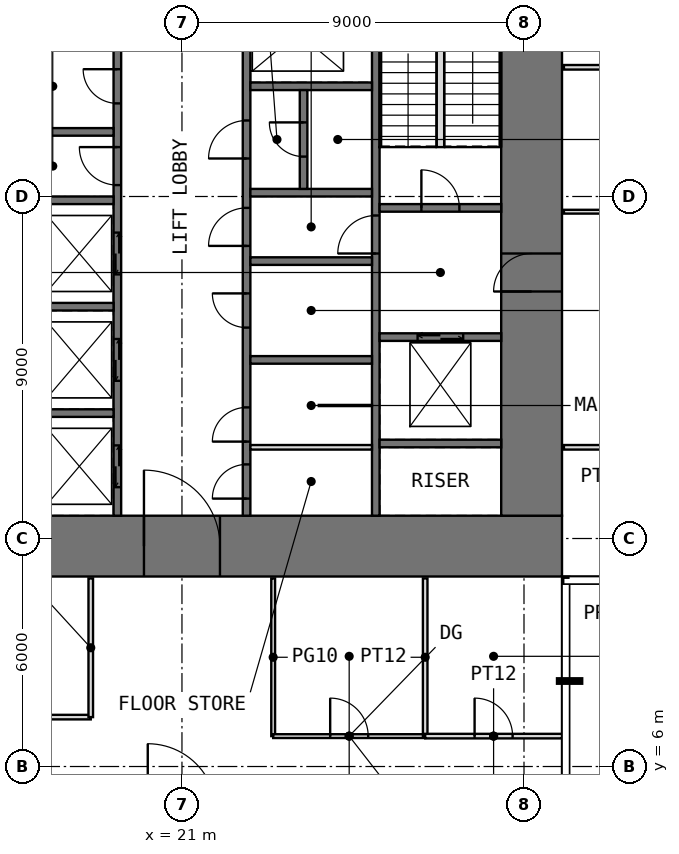
"""IFC4 building model, lengths in metres.
Left out: names, types, materials, properties, quantities, classifications, styles, units other than length and angle.
Written with IfcOpenShell. Run it as: python <this file> out.ifc"""

import sys

from ifc_helpers import new_model, si_unit, direction, frame, frame_2d, origin, place, context, subcontext, project, spatial, rectangle, extrude, element, fill, save


model = new_model("IFC4")
c1 = context("Model", 3, precision=1e-05, world=origin(), true_north=direction((0.0, 1.0)))
c2 = subcontext(c1, "Body", "Model", "MODEL_VIEW")
j1 = project(units=[si_unit("LENGTHUNIT", "METRE"), si_unit("PLANEANGLEUNIT", "RADIAN")], contexts=[c1])
p1 = place(None, origin())
s1 = spatial("IfcSite", under=j1, at=p1, CompositionType="ELEMENT")
p2 = place(p1, origin())
s2 = spatial("IfcBuilding", under=s1, at=p2, CompositionType="ELEMENT")
p3 = place(p2, frame((0.0, 0.0, 148.5)))
s3 = spatial("IfcBuildingStorey", under=s2, at=p3, CompositionType="ELEMENT", Elevation=148.5)
p4 = place(p3, frame((11.0, 11.8, -0.05), z_axis=(0.0, 0.0, 1.0), x_axis=(1.0, 0.0, 0.0)))
e1 = element("IfcWall", 1, at=p4, inside=s3, PredefinedType="SHEAR", context=c2, shape_type="SweptSolid", body=[
    extrude(rectangle(XDim=20.0, YDim=1.6, at=frame_2d((10.0, 0.0))), origin(), (0.0, 0.0, 1.0), 4.0),
])
p5 = place(p4, frame((9.0, 0.0, 0.05)))
e2 = element("IfcOpeningElement", 2, at=p5, cuts=e1, PredefinedType="OPENING", context=c2, shape_type="SweptSolid", body=[
    extrude(rectangle(XDim=2.0, YDim=2.2, at=frame_2d((1.0, 1.1))), frame((0.0, 0.81, 0.0), z_axis=(0.0, -1.0, 0.0), x_axis=(1.0, 0.0, 0.0)), (0.0, 0.0, 1.0), 1.62),
])
p6 = place(p3, frame((30.2, 12.6, -0.05), z_axis=(0.0, 0.0, 1.0), x_axis=(0.0, 1.0, 0.0)))
e3 = element("IfcWall", 3, at=p6, inside=s3, PredefinedType="SHEAR", context=c2, shape_type="SweptSolid", body=[
    extrude(rectangle(XDim=16.8, YDim=1.6, at=frame_2d((8.4, 0.0))), origin(), (0.0, 0.0, 1.0), 4.0),
])
p7 = place(p6, frame((5.9, 0.0, 0.05)))
e4 = element("IfcOpeningElement", 4, at=p7, cuts=e3, PredefinedType="OPENING", context=c2, shape_type="SweptSolid", body=[
    extrude(rectangle(XDim=1.0, YDim=2.2, at=frame_2d((0.5, 1.1))), frame((0.0, 0.81, 0.0), z_axis=(0.0, -1.0, 0.0), x_axis=(1.0, 0.0, 0.0)), (0.0, 0.0, 1.0), 1.62),
])
p8 = place(p3, frame((19.3, 12.6, -0.05), z_axis=(0.0, 0.0, 1.0), x_axis=(0.0, 1.0, 0.0)))
e5 = element("IfcWall", 5, at=p8, inside=s3, PredefinedType="SHEAR", context=c2, shape_type="SweptSolid", body=[
    extrude(rectangle(XDim=16.8, YDim=0.2, at=frame_2d((8.4, 0.0))), origin(), (0.0, 0.0, 1.0), 4.0),
])
p9 = place(p8, frame((8.7, 0.0, 0.05)))
e6 = element("IfcOpeningElement", 6, at=p9, cuts=e5, PredefinedType="OPENING", context=c2, shape_type="SweptSolid", body=[
    extrude(rectangle(XDim=1.0, YDim=2.2, at=frame_2d((0.5, 1.1))), frame((0.0, 0.11, 0.0), z_axis=(0.0, -1.0, 0.0), x_axis=(1.0, 0.0, 0.0)), (0.0, 0.0, 1.0), 0.22),
])
p10 = place(p8, frame((10.85, 0.0, 0.05)))
e7 = element("IfcOpeningElement", 7, at=p10, cuts=e5, PredefinedType="OPENING", context=c2, shape_type="SweptSolid", body=[
    extrude(rectangle(XDim=0.9, YDim=2.2, at=frame_2d((0.45, 1.1))), frame((0.0, 0.11, 0.0), z_axis=(0.0, -1.0, 0.0), x_axis=(1.0, 0.0, 0.0)), (0.0, 0.0, 1.0), 0.22),
])
p11 = place(p8, frame((13.3, 0.0, 0.05)))
e8 = element("IfcOpeningElement", 8, at=p11, cuts=e5, PredefinedType="OPENING", context=c2, shape_type="SweptSolid", body=[
    extrude(rectangle(XDim=1.0, YDim=2.2, at=frame_2d((0.5, 1.1))), frame((0.0, 0.11, 0.0), z_axis=(0.0, -1.0, 0.0), x_axis=(1.0, 0.0, 0.0)), (0.0, 0.0, 1.0), 0.22),
])
p12 = place(p8, frame((15.55, 0.0, 0.05)))
e9 = element("IfcOpeningElement", 9, at=p12, cuts=e5, PredefinedType="OPENING", context=c2, shape_type="SweptSolid", body=[
    extrude(rectangle(XDim=0.9, YDim=2.2, at=frame_2d((0.45, 1.1))), frame((0.0, 0.11, 0.0), z_axis=(0.0, -1.0, 0.0), x_axis=(1.0, 0.0, 0.0)), (0.0, 0.0, 1.0), 0.22),
])
p13 = place(p8, frame((0.75, 0.0, 0.05)))
e10 = element("IfcOpeningElement", 10, at=p13, cuts=e5, PredefinedType="OPENING", context=c2, shape_type="SweptSolid", body=[
    extrude(rectangle(XDim=1.1, YDim=2.2, at=frame_2d((0.55, 1.1))), frame((0.0, 0.11, 0.0), z_axis=(0.0, -1.0, 0.0), x_axis=(1.0, 0.0, 0.0)), (0.0, 0.0, 1.0), 0.22),
])
p14 = place(p8, frame((3.55, 0.0, 0.05)))
e11 = element("IfcOpeningElement", 11, at=p14, cuts=e5, PredefinedType="OPENING", context=c2, shape_type="SweptSolid", body=[
    extrude(rectangle(XDim=1.1, YDim=2.2, at=frame_2d((0.55, 1.1))), frame((0.0, 0.11, 0.0), z_axis=(0.0, -1.0, 0.0), x_axis=(1.0, 0.0, 0.0)), (0.0, 0.0, 1.0), 0.22),
])
p15 = place(p8, frame((6.35, 0.0, 0.05)))
e12 = element("IfcOpeningElement", 12, at=p15, cuts=e5, PredefinedType="OPENING", context=c2, shape_type="SweptSolid", body=[
    extrude(rectangle(XDim=1.1, YDim=2.2, at=frame_2d((0.55, 1.1))), frame((0.0, 0.11, 0.0), z_axis=(0.0, -1.0, 0.0), x_axis=(1.0, 0.0, 0.0)), (0.0, 0.0, 1.0), 0.22),
])
p16 = place(p3, frame((22.7, 12.6, -0.05), z_axis=(0.0, 0.0, 1.0), x_axis=(0.0, 1.0, 0.0)))
e13 = element("IfcWall", 13, at=p16, inside=s3, PredefinedType="SHEAR", context=c2, shape_type="SweptSolid", body=[
    extrude(rectangle(XDim=16.8, YDim=0.2, at=frame_2d((8.4, 0.0))), origin(), (0.0, 0.0, 1.0), 4.0),
])
p17 = place(p16, frame((0.45, 0.0, 0.05)))
e14 = element("IfcOpeningElement", 14, at=p17, cuts=e13, PredefinedType="OPENING", context=c2, shape_type="SweptSolid", body=[
    extrude(rectangle(XDim=0.9, YDim=2.2, at=frame_2d((0.45, 1.1))), frame((0.0, 0.11, 0.0), z_axis=(0.0, -1.0, 0.0), x_axis=(1.0, 0.0, 0.0)), (0.0, 0.0, 1.0), 0.22),
])
p18 = place(p16, frame((7.1, 0.0, 0.05)))
e15 = element("IfcOpeningElement", 15, at=p18, cuts=e13, PredefinedType="OPENING", context=c2, shape_type="SweptSolid", body=[
    extrude(rectangle(XDim=1.0, YDim=2.2, at=frame_2d((0.5, 1.1))), frame((0.0, 0.11, 0.0), z_axis=(0.0, -1.0, 0.0), x_axis=(1.0, 0.0, 0.0)), (0.0, 0.0, 1.0), 0.22),
])
p19 = place(p16, frame((1.95, 0.0, 0.05)))
e16 = element("IfcOpeningElement", 16, at=p19, cuts=e13, PredefinedType="OPENING", context=c2, shape_type="SweptSolid", body=[
    extrude(rectangle(XDim=0.9, YDim=2.2, at=frame_2d((0.45, 1.1))), frame((0.0, 0.11, 0.0), z_axis=(0.0, -1.0, 0.0), x_axis=(1.0, 0.0, 0.0)), (0.0, 0.0, 1.0), 0.22),
])
p20 = place(p16, frame((4.95, 0.0, 0.05)))
e17 = element("IfcOpeningElement", 17, at=p20, cuts=e13, PredefinedType="OPENING", context=c2, shape_type="SweptSolid", body=[
    extrude(rectangle(XDim=0.9, YDim=2.2, at=frame_2d((0.45, 1.1))), frame((0.0, 0.11, 0.0), z_axis=(0.0, -1.0, 0.0), x_axis=(1.0, 0.0, 0.0)), (0.0, 0.0, 1.0), 0.22),
])
p21 = place(p16, frame((9.4, 0.0, 0.05)))
e18 = element("IfcOpeningElement", 18, at=p21, cuts=e13, PredefinedType="OPENING", context=c2, shape_type="SweptSolid", body=[
    extrude(rectangle(XDim=1.0, YDim=2.2, at=frame_2d((0.5, 1.1))), frame((0.0, 0.11, 0.0), z_axis=(0.0, -1.0, 0.0), x_axis=(1.0, 0.0, 0.0)), (0.0, 0.0, 1.0), 0.22),
])
p22 = place(p3, frame((26.1, 12.6, -0.05), z_axis=(0.0, 0.0, 1.0), x_axis=(0.0, 1.0, 0.0)))
e19 = element("IfcWall", 19, at=p22, inside=s3, PredefinedType="SHEAR", context=c2, shape_type="SweptSolid", body=[
    extrude(rectangle(XDim=16.8, YDim=0.2, at=frame_2d((8.4, 0.0))), origin(), (0.0, 0.0, 1.0), 4.0),
])
p23 = place(p22, frame((6.9, 0.0, 0.05)))
e20 = element("IfcOpeningElement", 20, at=p23, cuts=e19, PredefinedType="OPENING", context=c2, shape_type="SweptSolid", body=[
    extrude(rectangle(XDim=1.0, YDim=2.2, at=frame_2d((0.5, 1.1))), frame((0.0, 0.11, 0.0), z_axis=(0.0, -1.0, 0.0), x_axis=(1.0, 0.0, 0.0)), (0.0, 0.0, 1.0), 0.22),
])
for number, where, z_axis, x_axis in (
    (21, (16.0, 15.3, -0.05), (0.0, 0.0, 1.0), (1.0, 0.0, 0.0)),
    (22, (16.0, 18.1, -0.05), (0.0, 0.0, 1.0), (1.0, 0.0, 0.0)),
    (23, (16.0, 20.9, -0.05), (0.0, 0.0, 1.0), (1.0, 0.0, 0.0)),
    (24, (16.0, 22.7, -0.05), (0.0, 0.0, 1.0), (1.0, 0.0, 0.0)),
    (25, (22.8, 16.7, -0.05), (0.0, 0.0, 1.0), (1.0, 0.0, 0.0)),
    (26, (22.8, 19.3, -0.05), (0.0, 0.0, 1.0), (1.0, 0.0, 0.0)),
    (27, (22.8, 21.1, -0.05), (0.0, 0.0, 1.0), (1.0, 0.0, 0.0)),
    (28, (22.8, 23.9, -0.05), (0.0, 0.0, 1.0), (1.0, 0.0, 0.0)),
    (29, (26.2, 14.5, -0.05), (0.0, 0.0, 1.0), (1.0, 0.0, 0.0)),
):
    element("IfcWall", number, at=place(p3, frame(where, z_axis=z_axis, x_axis=x_axis)), inside=s3, PredefinedType="SHEAR", context=c2, shape_type="SweptSolid", body=[
        extrude(rectangle(XDim=3.2, YDim=0.2, at=frame_2d((1.6, 0.0))), origin(), (0.0, 0.0, 1.0), 4.0),
    ])
p24 = place(p3, frame((26.2, 17.3, -0.05), z_axis=(0.0, 0.0, 1.0), x_axis=(1.0, 0.0, 0.0)))
e30 = element("IfcWall", 30, at=p24, inside=s3, PredefinedType="SHEAR", context=c2, shape_type="SweptSolid", body=[
    extrude(rectangle(XDim=3.2, YDim=0.2, at=frame_2d((1.6, 0.0))), origin(), (0.0, 0.0, 1.0), 4.0),
])
p25 = place(p24, frame((1.0, 0.0, 0.05)))
e31 = element("IfcOpeningElement", 31, at=p25, cuts=e30, PredefinedType="OPENING", context=c2, shape_type="SweptSolid", body=[
    extrude(rectangle(XDim=1.2, YDim=2.2, at=frame_2d((0.6, 1.1))), frame((0.0, 0.11, 0.0), z_axis=(0.0, -1.0, 0.0), x_axis=(1.0, 0.0, 0.0)), (0.0, 0.0, 1.0), 0.22),
])
p26 = place(p3, frame((26.2, 20.7, -0.05), z_axis=(0.0, 0.0, 1.0), x_axis=(1.0, 0.0, 0.0)))
e32 = element("IfcWall", 32, at=p26, inside=s3, PredefinedType="SHEAR", context=c2, shape_type="SweptSolid", body=[
    extrude(rectangle(XDim=3.2, YDim=0.2, at=frame_2d((1.6, 0.0))), origin(), (0.0, 0.0, 1.0), 4.0),
])
p27 = place(p26, frame((1.1, 0.0, 0.05)))
e33 = element("IfcOpeningElement", 33, at=p27, cuts=e32, PredefinedType="OPENING", context=c2, shape_type="SweptSolid", body=[
    extrude(rectangle(XDim=1.0, YDim=2.2, at=frame_2d((0.5, 1.1))), frame((0.0, 0.11, 0.0), z_axis=(0.0, -1.0, 0.0), x_axis=(1.0, 0.0, 0.0)), (0.0, 0.0, 1.0), 0.22),
])
p28 = place(p3, frame((22.8, 14.4, 0.0), z_axis=(0.0, 0.0, 1.0), x_axis=(1.0, 0.0, 0.0)))
e34 = element("IfcWall", 34, at=p28, inside=s3, PredefinedType="PARTITIONING", context=c2, shape_type="SweptSolid", body=[
    extrude(rectangle(XDim=3.2, YDim=0.12, at=frame_2d((1.6, 0.0))), origin(), (0.0, 0.0, 1.0), 3.75),
])
p29 = place(p3, frame((24.6, 15.5, 0.0), z_axis=(0.0, 0.0, 1.0), x_axis=(1.0, 0.0, 0.0)))
e35 = element("IfcWall", 35, at=p29, inside=s3, PredefinedType="PARTITIONING", context=c2, shape_type="SweptSolid", body=[
    extrude(rectangle(XDim=1.4, YDim=0.03, at=frame_2d((0.7, 0.0))), origin(), (0.0, 0.0, 1.0), 3.75),
])
p30 = place(p3, frame((24.2, 21.2, -0.05), z_axis=(0.0, 0.0, 1.0), x_axis=(0.0, 1.0, 0.0)))
e36 = element("IfcWall", 36, at=p30, inside=s3, PredefinedType="SHEAR", context=c2, shape_type="SweptSolid", body=[
    extrude(rectangle(XDim=2.6, YDim=0.2, at=frame_2d((1.3, 0.0))), origin(), (0.0, 0.0, 1.0), 4.0),
])
p31 = place(p30, frame((0.85, 0.0, 0.05)))
e37 = element("IfcOpeningElement", 37, at=p31, cuts=e36, PredefinedType="OPENING", context=c2, shape_type="SweptSolid", body=[
    extrude(rectangle(XDim=0.9, YDim=2.2, at=frame_2d((0.45, 1.1))), frame((0.0, 0.11, 0.0), z_axis=(0.0, -1.0, 0.0), x_axis=(1.0, 0.0, 0.0)), (0.0, 0.0, 1.0), 0.22),
])
p32 = place(p3, frame((15.0, 7.3, 0.0), z_axis=(0.0, 0.0, 1.0), x_axis=(1.0, 0.0, 0.0)))
e38 = element("IfcWall", 38, at=p32, inside=s3, PredefinedType="PARTITIONING", context=c2, shape_type="SweptSolid", body=[
    extrude(rectangle(XDim=3.6, YDim=0.12, at=frame_2d((1.8, 0.0))), origin(), (0.0, 0.0, 1.0), 3.75),
])
p33 = place(p32, frame((1.3, 0.0, 0.0)))
e39 = element("IfcOpeningElement", 39, at=p33, cuts=e38, PredefinedType="OPENING", context=c2, shape_type="SweptSolid", body=[
    extrude(rectangle(XDim=1.0, YDim=2.2, at=frame_2d((0.5, 1.1))), frame((0.0, 0.07, 0.0), z_axis=(0.0, -1.0, 0.0), x_axis=(1.0, 0.0, 0.0)), (0.0, 0.0, 1.0), 0.14),
])
p34 = place(p3, frame((18.6, 7.3, 0.0), z_axis=(0.0, 0.0, 1.0), x_axis=(0.0, 1.0, 0.0)))
e40 = element("IfcWall", 40, at=p34, inside=s3, PredefinedType="PARTITIONING", context=c2, shape_type="SweptSolid", body=[
    extrude(rectangle(XDim=3.65, YDim=0.12, at=frame_2d((1.825, 0.0))), origin(), (0.0, 0.0, 1.0), 3.75),
])
p35 = place(p3, frame((23.4, 6.8, 0.0), z_axis=(0.0, 0.0, 1.0), x_axis=(0.0, 1.0, 0.0)))
e41 = element("IfcWall", 41, at=p35, inside=s3, PredefinedType="PARTITIONING", context=c2, shape_type="SweptSolid", body=[
    extrude(rectangle(XDim=4.15, YDim=0.1, at=frame_2d((2.075, 0.0))), origin(), (0.0, 0.0, 1.0), 3.75),
])
p36 = place(p3, frame((23.4, 6.8, 0.0), z_axis=(0.0, 0.0, 1.0), x_axis=(1.0, 0.0, 0.0)))
e42 = element("IfcWall", 42, at=p36, inside=s3, PredefinedType="PARTITIONING", context=c2, shape_type="SweptSolid", body=[
    extrude(rectangle(XDim=4.0, YDim=0.1, at=frame_2d((2.0, 0.0))), origin(), (0.0, 0.0, 1.0), 3.75),
])
p37 = place(p36, frame((1.5, 0.0, 0.0)))
e43 = element("IfcOpeningElement", 43, at=p37, cuts=e42, PredefinedType="OPENING", context=c2, shape_type="SweptSolid", body=[
    extrude(rectangle(XDim=1.0, YDim=2.4, at=frame_2d((0.5, 1.2))), frame((0.0, 0.06, 0.0), z_axis=(0.0, -1.0, 0.0), x_axis=(1.0, 0.0, 0.0)), (0.0, 0.0, 1.0), 0.12),
])
p38 = place(p3, frame((27.4, 6.8, 0.0), z_axis=(0.0, 0.0, 1.0), x_axis=(0.0, 1.0, 0.0)))
e44 = element("IfcWall", 44, at=p38, inside=s3, PredefinedType="PARTITIONING", context=c2, shape_type="SweptSolid", body=[
    extrude(rectangle(XDim=4.15, YDim=0.12, at=frame_2d((2.075, 0.0))), origin(), (0.0, 0.0, 1.0), 3.75),
])
p39 = place(p3, frame((27.4, 6.8, 0.0), z_axis=(0.0, 0.0, 1.0), x_axis=(1.0, 0.0, 0.0)))
e45 = element("IfcWall", 45, at=p39, inside=s3, PredefinedType="PARTITIONING", context=c2, shape_type="SweptSolid", body=[
    extrude(rectangle(XDim=3.6, YDim=0.12, at=frame_2d((1.8, 0.0))), origin(), (0.0, 0.0, 1.0), 3.75),
])
p40 = place(p39, frame((1.3, 0.0, 0.0)))
e46 = element("IfcOpeningElement", 46, at=p40, cuts=e45, PredefinedType="OPENING", context=c2, shape_type="SweptSolid", body=[
    extrude(rectangle(XDim=1.0, YDim=2.2, at=frame_2d((0.5, 1.1))), frame((0.0, 0.07, 0.0), z_axis=(0.0, -1.0, 0.0), x_axis=(1.0, 0.0, 0.0)), (0.0, 0.0, 1.0), 0.14),
])
p41 = place(p3, frame((31.05, 14.4, 0.0), z_axis=(0.0, 0.0, 1.0), x_axis=(1.0, 0.0, 0.0)))
e47 = element("IfcWall", 47, at=p41, inside=s3, PredefinedType="PARTITIONING", context=c2, shape_type="SweptSolid", body=[
    extrude(rectangle(XDim=3.65, YDim=0.12, at=frame_2d((1.825, 0.0))), origin(), (0.0, 0.0, 1.0), 3.75),
])
p42 = place(p3, frame((31.05, 20.6, 0.0), z_axis=(0.0, 0.0, 1.0), x_axis=(1.0, 0.0, 0.0)))
e48 = element("IfcWall", 48, at=p42, inside=s3, PredefinedType="PARTITIONING", context=c2, shape_type="SweptSolid", body=[
    extrude(rectangle(XDim=4.15, YDim=0.1, at=frame_2d((2.075, 0.0))), origin(), (0.0, 0.0, 1.0), 3.75),
])
p43 = place(p3, frame((31.05, 24.4, 0.0), z_axis=(0.0, 0.0, 1.0), x_axis=(1.0, 0.0, 0.0)))
e49 = element("IfcWall", 49, at=p43, inside=s3, PredefinedType="PARTITIONING", context=c2, shape_type="SweptSolid", body=[
    extrude(rectangle(XDim=4.15, YDim=0.12, at=frame_2d((2.075, 0.0))), origin(), (0.0, 0.0, 1.0), 3.75),
])
p44 = place(p3, frame((27.8, 22.3, 0.0), z_axis=(0.0, 0.0, 1.0), x_axis=(0.0, 1.0, 0.0)))
e50 = element("IfcWall", 50, at=p44, inside=s3, PredefinedType="PARTITIONING", context=c2, shape_type="SweptSolid", body=[
    extrude(rectangle(XDim=3.08, YDim=0.2, at=frame_2d((1.54, 0.0))), origin(), (0.0, 0.0, 1.0), 4.0),
])
p45 = place(p5, origin())
e51 = element("IfcDoor", 51, at=p45, inside=s3, OperationType="DOUBLE_DOOR_SINGLE_SWING", PredefinedType="DOOR", context=c2, shape_type="SweptSolid", body=[
    extrude(rectangle(XDim=2.0, YDim=2.2, at=frame_2d((1.0, 1.1))), frame((0.0, 0.025, 0.0), z_axis=(0.0, -1.0, 0.0), x_axis=(1.0, 0.0, 0.0)), (0.0, 0.0, 1.0), 0.05),
])
fill(e2, e51)
p46 = place(p17, origin())
e52 = element("IfcDoor", 52, at=p46, inside=s3, OperationType="SINGLE_SWING_LEFT", PredefinedType="DOOR", context=c2, shape_type="SweptSolid", body=[
    extrude(rectangle(XDim=0.9, YDim=2.2, at=frame_2d((0.45, 1.1))), frame((0.0, 0.025, 0.0), z_axis=(0.0, -1.0, 0.0), x_axis=(1.0, 0.0, 0.0)), (0.0, 0.0, 1.0), 0.05),
])
fill(e14, e52)
p47 = place(p7, origin())
e53 = element("IfcDoor", 53, at=p47, inside=s3, OperationType="SINGLE_SWING_LEFT", PredefinedType="DOOR", context=c2, shape_type="SweptSolid", body=[
    extrude(rectangle(XDim=1.0, YDim=2.2, at=frame_2d((0.5, 1.1))), frame((0.0, 0.025, 0.0), z_axis=(0.0, -1.0, 0.0), x_axis=(1.0, 0.0, 0.0)), (0.0, 0.0, 1.0), 0.05),
])
fill(e4, e53)
p48 = place(p27, origin())
e54 = element("IfcDoor", 54, at=p48, inside=s3, OperationType="SINGLE_SWING_LEFT", PredefinedType="DOOR", context=c2, shape_type="SweptSolid", body=[
    extrude(rectangle(XDim=1.0, YDim=2.2, at=frame_2d((0.5, 1.1))), frame((0.0, 0.025, 0.0), z_axis=(0.0, -1.0, 0.0), x_axis=(1.0, 0.0, 0.0)), (0.0, 0.0, 1.0), 0.05),
])
fill(e33, e54)
p49 = place(p23, origin())
e55 = element("IfcDoor", 55, at=p49, inside=s3, OperationType="SINGLE_SWING_LEFT", PredefinedType="DOOR", context=c2, shape_type="SweptSolid", body=[
    extrude(rectangle(XDim=1.0, YDim=2.2, at=frame_2d((0.5, 1.1))), frame((0.0, 0.025, 0.0), z_axis=(0.0, -1.0, 0.0), x_axis=(1.0, 0.0, 0.0)), (0.0, 0.0, 1.0), 0.05),
])
fill(e20, e55)
p50 = place(p9, origin())
e56 = element("IfcDoor", 56, at=p50, inside=s3, OperationType="SINGLE_SWING_RIGHT", PredefinedType="DOOR", context=c2, shape_type="SweptSolid", body=[
    extrude(rectangle(XDim=1.0, YDim=2.2, at=frame_2d((0.5, 1.1))), frame((0.0, 0.025, 0.0), z_axis=(0.0, -1.0, 0.0), x_axis=(1.0, 0.0, 0.0)), (0.0, 0.0, 1.0), 0.05),
])
fill(e6, e56)
p51 = place(p18, origin())
e57 = element("IfcDoor", 57, at=p51, inside=s3, OperationType="SINGLE_SWING_LEFT", PredefinedType="DOOR", context=c2, shape_type="SweptSolid", body=[
    extrude(rectangle(XDim=1.0, YDim=2.2, at=frame_2d((0.5, 1.1))), frame((0.0, 0.025, 0.0), z_axis=(0.0, -1.0, 0.0), x_axis=(1.0, 0.0, 0.0)), (0.0, 0.0, 1.0), 0.05),
])
fill(e15, e57)
p52 = place(p10, origin())
e58 = element("IfcDoor", 58, at=p52, inside=s3, OperationType="SINGLE_SWING_RIGHT", PredefinedType="DOOR", context=c2, shape_type="SweptSolid", body=[
    extrude(rectangle(XDim=0.9, YDim=2.2, at=frame_2d((0.45, 1.1))), frame((0.0, 0.025, 0.0), z_axis=(0.0, -1.0, 0.0), x_axis=(1.0, 0.0, 0.0)), (0.0, 0.0, 1.0), 0.05),
])
fill(e7, e58)
p53 = place(p19, origin())
e59 = element("IfcDoor", 59, at=p53, inside=s3, OperationType="SINGLE_SWING_LEFT", PredefinedType="DOOR", context=c2, shape_type="SweptSolid", body=[
    extrude(rectangle(XDim=0.9, YDim=2.2, at=frame_2d((0.45, 1.1))), frame((0.0, 0.025, 0.0), z_axis=(0.0, -1.0, 0.0), x_axis=(1.0, 0.0, 0.0)), (0.0, 0.0, 1.0), 0.05),
])
fill(e16, e59)
p54 = place(p20, origin())
e60 = element("IfcDoor", 60, at=p54, inside=s3, OperationType="SINGLE_SWING_RIGHT", PredefinedType="DOOR", context=c2, shape_type="SweptSolid", body=[
    extrude(rectangle(XDim=0.9, YDim=2.2, at=frame_2d((0.45, 1.1))), frame((0.0, 0.025, 0.0), z_axis=(0.0, -1.0, 0.0), x_axis=(1.0, 0.0, 0.0)), (0.0, 0.0, 1.0), 0.05),
])
fill(e17, e60)
p55 = place(p21, origin())
e61 = element("IfcDoor", 61, at=p55, inside=s3, OperationType="SINGLE_SWING_LEFT", PredefinedType="DOOR", context=c2, shape_type="SweptSolid", body=[
    extrude(rectangle(XDim=1.0, YDim=2.2, at=frame_2d((0.5, 1.1))), frame((0.0, 0.025, 0.0), z_axis=(0.0, -1.0, 0.0), x_axis=(1.0, 0.0, 0.0)), (0.0, 0.0, 1.0), 0.05),
])
fill(e18, e61)
p56 = place(p31, origin())
e62 = element("IfcDoor", 62, at=p56, inside=s3, OperationType="SINGLE_SWING_RIGHT", PredefinedType="DOOR", context=c2, shape_type="SweptSolid", body=[
    extrude(rectangle(XDim=0.9, YDim=2.2, at=frame_2d((0.45, 1.1))), frame((0.0, 0.025, 0.0), z_axis=(0.0, -1.0, 0.0), x_axis=(1.0, 0.0, 0.0)), (0.0, 0.0, 1.0), 0.05),
])
fill(e37, e62)
p57 = place(p37, origin())
e63 = element("IfcDoor", 63, at=p57, inside=s3, OperationType="SINGLE_SWING_LEFT", PredefinedType="DOOR", context=c2, shape_type="SweptSolid", body=[
    extrude(rectangle(XDim=1.0, YDim=2.4, at=frame_2d((0.5, 1.2))), frame((0.0, 0.025, 0.0), z_axis=(0.0, -1.0, 0.0), x_axis=(1.0, 0.0, 0.0)), (0.0, 0.0, 1.0), 0.05),
])
fill(e43, e63)
p58 = place(p40, origin())
e64 = element("IfcDoor", 64, at=p58, inside=s3, OperationType="SINGLE_SWING_LEFT", PredefinedType="DOOR", context=c2, shape_type="SweptSolid", body=[
    extrude(rectangle(XDim=1.0, YDim=2.2, at=frame_2d((0.5, 1.1))), frame((0.0, 0.025, 0.0), z_axis=(0.0, -1.0, 0.0), x_axis=(1.0, 0.0, 0.0)), (0.0, 0.0, 1.0), 0.05),
])
fill(e46, e64)
p59 = place(p13, origin())
e65 = element("IfcDoor", 65, at=p59, inside=s3, OperationType="DOUBLE_DOOR_SLIDING", PredefinedType="DOOR", context=c2, shape_type="SweptSolid", body=[
    extrude(rectangle(XDim=1.1, YDim=2.2, at=frame_2d((0.55, 1.1))), frame((0.0, 0.025, 0.0), z_axis=(0.0, -1.0, 0.0), x_axis=(1.0, 0.0, 0.0)), (0.0, 0.0, 1.0), 0.05),
])
fill(e10, e65)
p60 = place(p14, origin())
e66 = element("IfcDoor", 66, at=p60, inside=s3, OperationType="DOUBLE_DOOR_SLIDING", PredefinedType="DOOR", context=c2, shape_type="SweptSolid", body=[
    extrude(rectangle(XDim=1.1, YDim=2.2, at=frame_2d((0.55, 1.1))), frame((0.0, 0.025, 0.0), z_axis=(0.0, -1.0, 0.0), x_axis=(1.0, 0.0, 0.0)), (0.0, 0.0, 1.0), 0.05),
])
fill(e11, e66)
p61 = place(p15, origin())
e67 = element("IfcDoor", 67, at=p61, inside=s3, OperationType="DOUBLE_DOOR_SLIDING", PredefinedType="DOOR", context=c2, shape_type="SweptSolid", body=[
    extrude(rectangle(XDim=1.1, YDim=2.2, at=frame_2d((0.55, 1.1))), frame((0.0, 0.025, 0.0), z_axis=(0.0, -1.0, 0.0), x_axis=(1.0, 0.0, 0.0)), (0.0, 0.0, 1.0), 0.05),
])
fill(e12, e67)
p62 = place(p25, origin())
e68 = element("IfcDoor", 68, at=p62, inside=s3, OperationType="DOUBLE_DOOR_SLIDING", PredefinedType="DOOR", context=c2, shape_type="SweptSolid", body=[
    extrude(rectangle(XDim=1.2, YDim=2.2, at=frame_2d((0.6, 1.1))), frame((0.0, 0.025, 0.0), z_axis=(0.0, -1.0, 0.0), x_axis=(1.0, 0.0, 0.0)), (0.0, 0.0, 1.0), 0.05),
])
fill(e31, e68)
save(model, sys.argv[1])
